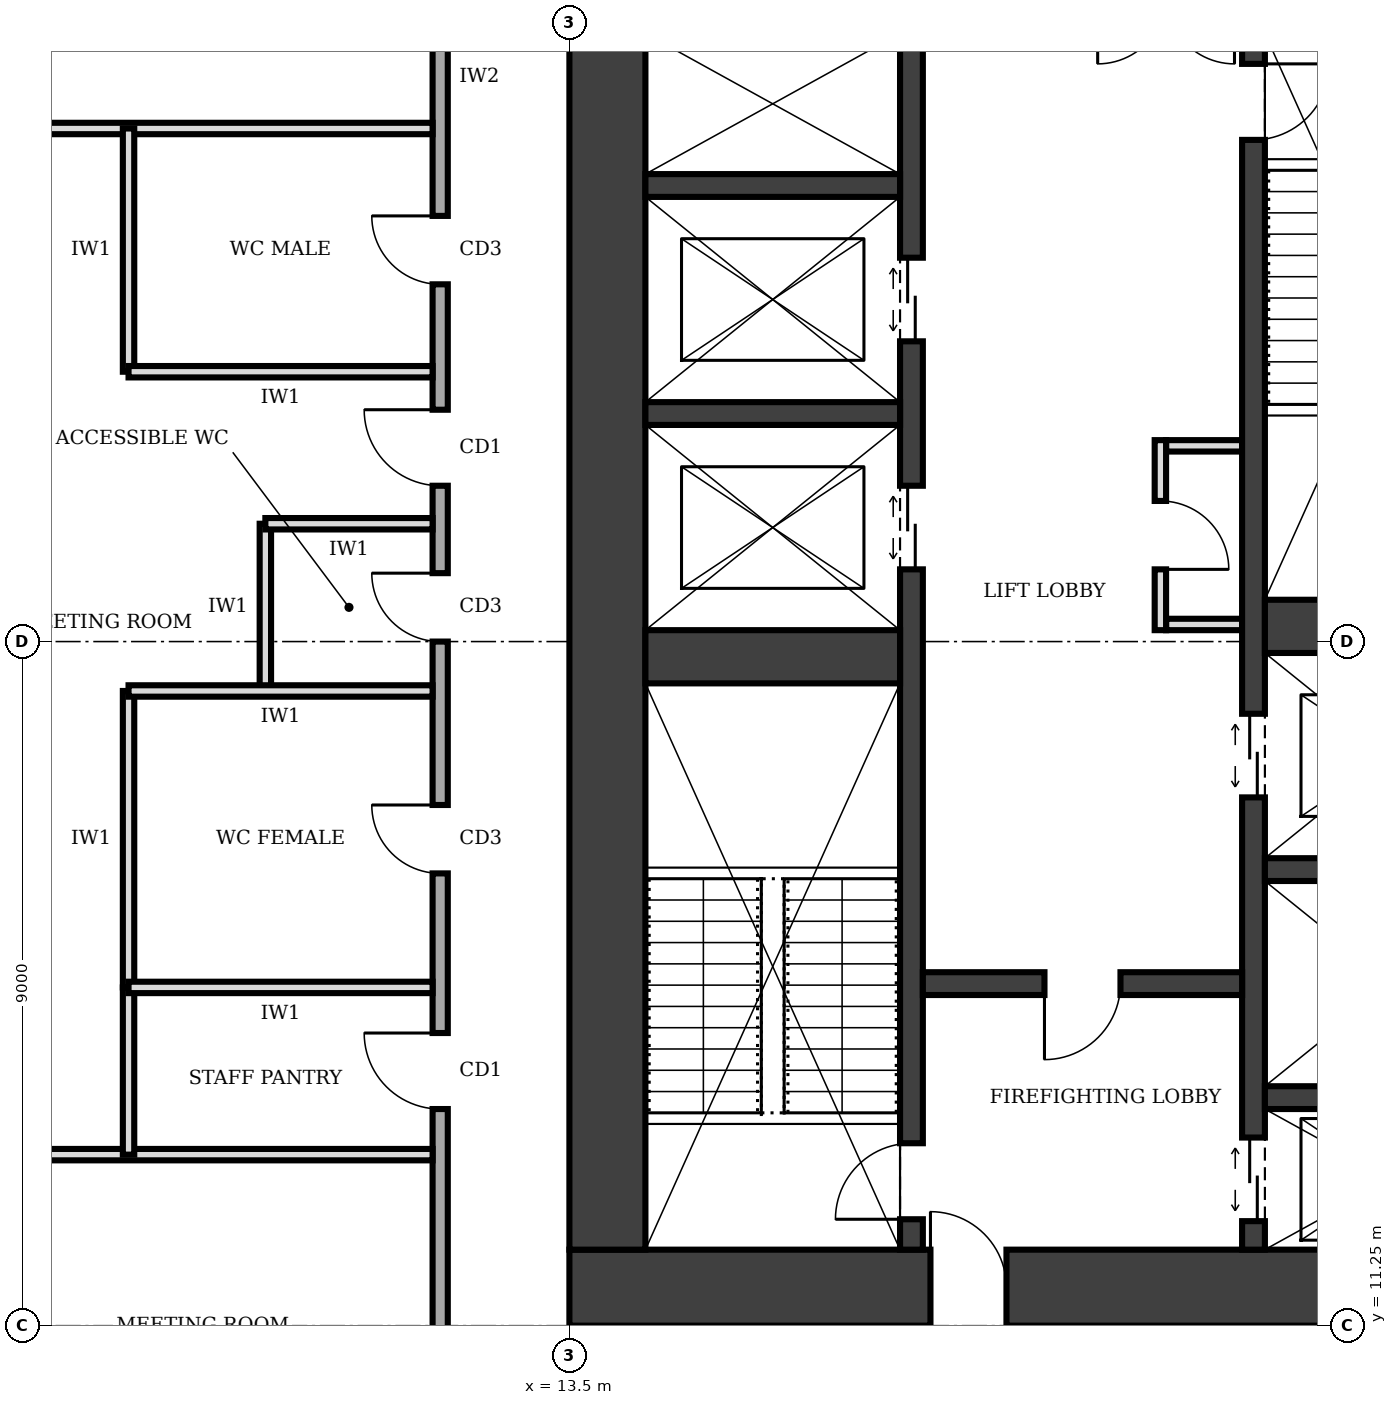
"""IFC4 building model, lengths in metres.
Left out: names, types, materials, properties, quantities, classifications, styles, units other than length and angle.
Written with IfcOpenShell. Run it as: python <this file> out.ifc"""

import sys

from ifc_helpers import new_model, si_unit, direction, frame, frame_2d, origin, place, context, subcontext, project, spatial, rectangle, extrude, element, fill, save


model = new_model("IFC4")
c1 = context("Model", 3, precision=1e-05, world=origin(), true_north=direction((0.0, 1.0)))
c2 = subcontext(c1, "Body", "Model", "MODEL_VIEW")
j1 = project(units=[si_unit("LENGTHUNIT", "METRE"), si_unit("PLANEANGLEUNIT", "RADIAN")], contexts=[c1])
p1 = place(None, origin())
s1 = spatial("IfcSite", under=j1, at=p1, CompositionType="ELEMENT")
p2 = place(p1, origin())
s2 = spatial("IfcBuilding", under=s1, at=p2, CompositionType="ELEMENT")
p3 = place(p2, frame((0.0, 0.0, 93.0)))
s3 = spatial("IfcBuildingStorey", under=s2, at=p3, CompositionType="ELEMENT", Elevation=93.0)
p4 = place(p3, frame((13.5, 11.75, 0.0), z_axis=(0.0, 0.0, 1.0), x_axis=(1.0, 0.0, 0.0)))
e1 = element("IfcWall", 1, at=p4, inside=s3, PredefinedType="SHEAR", context=c2, shape_type="SweptSolid", body=[
    extrude(rectangle(XDim=13.5, YDim=1.0, at=frame_2d((6.75, 0.0))), origin(), (0.0, 0.0, 1.0), 4.0),
])
p5 = place(p4, frame((4.75, 0.0, 0.0)))
e2 = element("IfcOpeningElement", 2, at=p5, cuts=e1, PredefinedType="OPENING", context=c2, shape_type="SweptSolid", body=[
    extrude(rectangle(XDim=1.0, YDim=2.1, at=frame_2d((0.5, 1.05))), frame((0.0, 0.51, 0.0), z_axis=(0.0, -1.0, 0.0), x_axis=(1.0, 0.0, 0.0)), (0.0, 0.0, 1.0), 1.02),
])
p6 = place(p3, frame((14.0, 28.25, 0.0), z_axis=(0.0, 0.0, 1.0), x_axis=(0.0, -1.0, 0.0)))
e3 = element("IfcWall", 3, at=p6, inside=s3, PredefinedType="SHEAR", context=c2, shape_type="SweptSolid", body=[
    extrude(rectangle(XDim=16.0, YDim=1.0, at=frame_2d((8.0, 0.0))), origin(), (0.0, 0.0, 1.0), 4.0),
])
p7 = place(p3, frame((18.0, 12.25, 0.0), z_axis=(0.0, 0.0, 1.0), x_axis=(0.0, 1.0, 0.0)))
e4 = element("IfcWall", 4, at=p7, inside=s3, PredefinedType="SHEAR", context=c2, shape_type="SweptSolid", body=[
    extrude(rectangle(XDim=16.0, YDim=0.3, at=frame_2d((8.0, 0.0))), origin(), (0.0, 0.0, 1.0), 4.0),
])
p8 = place(p7, frame((0.4, 0.0, 0.0)))
e5 = element("IfcOpeningElement", 5, at=p8, cuts=e4, PredefinedType="OPENING", context=c2, shape_type="SweptSolid", body=[
    extrude(rectangle(XDim=1.0, YDim=2.1, at=frame_2d((0.5, 1.05))), frame((0.0, 0.16, 0.0), z_axis=(0.0, -1.0, 0.0), x_axis=(1.0, 0.0, 0.0)), (0.0, 0.0, 1.0), 0.32),
])
p9 = place(p7, frame((8.95, 0.0, 0.0)))
e6 = element("IfcOpeningElement", 6, at=p9, cuts=e4, PredefinedType="OPENING", context=c2, shape_type="SweptSolid", body=[
    extrude(rectangle(XDim=1.1, YDim=2.1, at=frame_2d((0.55, 1.05))), frame((0.0, 0.16, 0.0), z_axis=(0.0, -1.0, 0.0), x_axis=(1.0, 0.0, 0.0)), (0.0, 0.0, 1.0), 0.32),
])
p10 = place(p7, frame((11.95, 0.0, 0.0)))
e7 = element("IfcOpeningElement", 7, at=p10, cuts=e4, PredefinedType="OPENING", context=c2, shape_type="SweptSolid", body=[
    extrude(rectangle(XDim=1.1, YDim=2.1, at=frame_2d((0.55, 1.05))), frame((0.0, 0.16, 0.0), z_axis=(0.0, -1.0, 0.0), x_axis=(1.0, 0.0, 0.0)), (0.0, 0.0, 1.0), 0.32),
])
p11 = place(p3, frame((22.5, 12.25, 0.0), z_axis=(0.0, 0.0, 1.0), x_axis=(0.0, 1.0, 0.0)))
e8 = element("IfcWall", 8, at=p11, inside=s3, PredefinedType="SHEAR", context=c2, shape_type="SweptSolid", body=[
    extrude(rectangle(XDim=16.0, YDim=0.3, at=frame_2d((8.0, 0.0))), origin(), (0.0, 0.0, 1.0), 4.0),
])
p12 = place(p11, frame((14.6, 0.0, 0.0)))
e9 = element("IfcOpeningElement", 9, at=p12, cuts=e8, PredefinedType="OPENING", context=c2, shape_type="SweptSolid", body=[
    extrude(rectangle(XDim=1.0, YDim=2.1, at=frame_2d((0.5, 1.05))), frame((0.0, 0.16, 0.0), z_axis=(0.0, -1.0, 0.0), x_axis=(1.0, 0.0, 0.0)), (0.0, 0.0, 1.0), 0.32),
])
p13 = place(p11, frame((0.375, 0.0, 0.0)))
e10 = element("IfcOpeningElement", 10, at=p13, cuts=e8, PredefinedType="OPENING", context=c2, shape_type="SweptSolid", body=[
    extrude(rectangle(XDim=1.1, YDim=2.1, at=frame_2d((0.55, 1.05))), frame((0.0, 0.16, 0.0), z_axis=(0.0, -1.0, 0.0), x_axis=(1.0, 0.0, 0.0)), (0.0, 0.0, 1.0), 0.32),
])
p14 = place(p11, frame((5.95, 0.0, 0.0)))
e11 = element("IfcOpeningElement", 11, at=p14, cuts=e8, PredefinedType="OPENING", context=c2, shape_type="SweptSolid", body=[
    extrude(rectangle(XDim=1.1, YDim=2.1, at=frame_2d((0.55, 1.05))), frame((0.0, 0.16, 0.0), z_axis=(0.0, -1.0, 0.0), x_axis=(1.0, 0.0, 0.0)), (0.0, 0.0, 1.0), 0.32),
])
p15 = place(p3, frame((14.5, 20.05, 0.0), z_axis=(0.0, 0.0, 1.0), x_axis=(1.0, 0.0, 0.0)))
e12 = element("IfcWall", 12, at=p15, inside=s3, PredefinedType="SHEAR", context=c2, shape_type="SweptSolid", body=[
    extrude(rectangle(XDim=3.35, YDim=0.7, at=frame_2d((1.675, 0.0))), origin(), (0.0, 0.0, 1.0), 4.0),
])
p16 = place(p3, frame((18.15, 15.75, 0.0), z_axis=(0.0, 0.0, 1.0), x_axis=(1.0, 0.0, 0.0)))
e13 = element("IfcWall", 13, at=p16, inside=s3, PredefinedType="SHEAR", context=c2, shape_type="SweptSolid", body=[
    extrude(rectangle(XDim=4.2, YDim=0.3, at=frame_2d((2.1, 0.0))), origin(), (0.0, 0.0, 1.0), 4.0),
])
p17 = place(p16, frame((1.6, 0.0, 0.0)))
e14 = element("IfcOpeningElement", 14, at=p17, cuts=e13, PredefinedType="OPENING", context=c2, shape_type="SweptSolid", body=[
    extrude(rectangle(XDim=1.0, YDim=2.1, at=frame_2d((0.5, 1.05))), frame((0.0, 0.16, 0.0), z_axis=(0.0, -1.0, 0.0), x_axis=(1.0, 0.0, 0.0)), (0.0, 0.0, 1.0), 0.32),
])
for number, where, z_axis, x_axis in (
    (15, (22.65, 14.25, 0.0), (0.0, 0.0, 1.0), (1.0, 0.0, 0.0)),
    (16, (22.65, 17.25, 0.0), (0.0, 0.0, 1.0), (1.0, 0.0, 0.0)),
):
    element("IfcWall", number, at=place(p3, frame(where, z_axis=z_axis, x_axis=x_axis)), inside=s3, PredefinedType="SHEAR", context=c2, shape_type="SweptSolid", body=[
        extrude(rectangle(XDim=3.35, YDim=0.3, at=frame_2d((1.675, 0.0))), origin(), (0.0, 0.0, 1.0), 4.0),
    ])
p18 = place(p3, frame((22.65, 20.45, 0.0), z_axis=(0.0, 0.0, 1.0), x_axis=(1.0, 0.0, 0.0)))
e17 = element("IfcWall", 17, at=p18, inside=s3, PredefinedType="SHEAR", context=c2, shape_type="SweptSolid", body=[
    extrude(rectangle(XDim=3.35, YDim=0.7, at=frame_2d((1.675, 0.0))), origin(), (0.0, 0.0, 1.0), 4.0),
])
for number, where, z_axis, x_axis in (
    (18, (14.5, 23.25, 0.0), (0.0, 0.0, 1.0), (1.0, 0.0, 0.0)),
    (19, (14.5, 26.25, 0.0), (0.0, 0.0, 1.0), (1.0, 0.0, 0.0)),
):
    element("IfcWall", number, at=place(p3, frame(where, z_axis=z_axis, x_axis=x_axis)), inside=s3, PredefinedType="SHEAR", context=c2, shape_type="SweptSolid", body=[
        extrude(rectangle(XDim=3.35, YDim=0.3, at=frame_2d((1.675, 0.0))), origin(), (0.0, 0.0, 1.0), 4.0),
    ])
p19 = place(p3, frame((21.275, 20.4, 0.0), z_axis=(0.0, 0.0, 1.0), x_axis=(0.0, 1.0, 0.0)))
e20 = element("IfcWall", 20, at=p19, inside=s3, PredefinedType="PARTITIONING", context=c2, shape_type="SweptSolid", body=[
    extrude(rectangle(XDim=2.5, YDim=0.15, at=frame_2d((1.25, 0.0))), origin(), (0.0, 0.0, 1.0), 3.75),
])
p20 = place(p19, frame((0.8, 0.0, 0.0)))
e21 = element("IfcOpeningElement", 21, at=p20, cuts=e20, PredefinedType="OPENING", context=c2, shape_type="SweptSolid", body=[
    extrude(rectangle(XDim=0.9, YDim=2.1, at=frame_2d((0.45, 1.05))), frame((0.0, 0.085, 0.0), z_axis=(0.0, -1.0, 0.0), x_axis=(1.0, 0.0, 0.0)), (0.0, 0.0, 1.0), 0.17),
])
for number, where, z_axis, x_axis in (
    (22, (21.35, 20.475, 0.0), (0.0, 0.0, 1.0), (1.0, 0.0, 0.0)),
    (23, (21.35, 22.825, 0.0), (0.0, 0.0, 1.0), (1.0, 0.0, 0.0)),
):
    element("IfcWall", number, at=place(p3, frame(where, z_axis=z_axis, x_axis=x_axis)), inside=s3, PredefinedType="PARTITIONING", context=c2, shape_type="SweptSolid", body=[
        extrude(rectangle(XDim=1.0, YDim=0.15, at=frame_2d((0.5, 0.0))), origin(), (0.0, 0.0, 1.0), 3.75),
    ])
p21 = place(p3, frame((11.8, 32.8, 0.0), z_axis=(0.0, 0.0, 1.0), x_axis=(0.0, -1.0, 0.0)))
e24 = element("IfcWall", 24, at=p21, inside=s3, PredefinedType="SOLIDWALL", context=c2, shape_type="SweptSolid", body=[
    extrude(rectangle(XDim=25.3, YDim=0.2, at=frame_2d((12.65, 0.0))), origin(), (0.0, 0.0, 1.0), 3.75),
])
p22 = place(p21, frame((21.8, 0.0, 0.0)))
e25 = element("IfcOpeningElement", 25, at=p22, cuts=e24, PredefinedType="OPENING", context=c2, shape_type="SweptSolid", body=[
    extrude(rectangle(XDim=1.0, YDim=2.1, at=frame_2d((0.5, 1.05))), frame((0.0, 0.11, 0.0), z_axis=(0.0, -1.0, 0.0), x_axis=(1.0, 0.0, 0.0)), (0.0, 0.0, 1.0), 0.22),
])
p23 = place(p21, frame((17.7, 0.0, 0.0)))
e26 = element("IfcOpeningElement", 26, at=p23, cuts=e24, PredefinedType="OPENING", context=c2, shape_type="SweptSolid", body=[
    extrude(rectangle(XDim=1.0, YDim=2.1, at=frame_2d((0.5, 1.05))), frame((0.0, 0.11, 0.0), z_axis=(0.0, -1.0, 0.0), x_axis=(1.0, 0.0, 0.0)), (0.0, 0.0, 1.0), 0.22),
])
p24 = place(p21, frame((14.7, 0.0, 0.0)))
e27 = element("IfcOpeningElement", 27, at=p24, cuts=e24, PredefinedType="OPENING", context=c2, shape_type="SweptSolid", body=[
    extrude(rectangle(XDim=0.9, YDim=2.1, at=frame_2d((0.45, 1.05))), frame((0.0, 0.11, 0.0), z_axis=(0.0, -1.0, 0.0), x_axis=(1.0, 0.0, 0.0)), (0.0, 0.0, 1.0), 0.22),
])
p25 = place(p21, frame((11.65, 0.0, 0.0)))
e28 = element("IfcOpeningElement", 28, at=p25, cuts=e24, PredefinedType="OPENING", context=c2, shape_type="SweptSolid", body=[
    extrude(rectangle(XDim=0.9, YDim=2.1, at=frame_2d((0.45, 1.05))), frame((0.0, 0.11, 0.0), z_axis=(0.0, -1.0, 0.0), x_axis=(1.0, 0.0, 0.0)), (0.0, 0.0, 1.0), 0.22),
])
p26 = place(p21, frame((6.95, 0.0, 0.0)))
e29 = element("IfcOpeningElement", 29, at=p26, cuts=e24, PredefinedType="OPENING", context=c2, shape_type="SweptSolid", body=[
    extrude(rectangle(XDim=0.9, YDim=2.1, at=frame_2d((0.45, 1.05))), frame((0.0, 0.11, 0.0), z_axis=(0.0, -1.0, 0.0), x_axis=(1.0, 0.0, 0.0)), (0.0, 0.0, 1.0), 0.22),
])
p27 = place(p21, frame((9.5, 0.0, 0.0)))
e30 = element("IfcOpeningElement", 30, at=p27, cuts=e24, PredefinedType="OPENING", context=c2, shape_type="SweptSolid", body=[
    extrude(rectangle(XDim=1.0, YDim=2.1, at=frame_2d((0.5, 1.05))), frame((0.0, 0.11, 0.0), z_axis=(0.0, -1.0, 0.0), x_axis=(1.0, 0.0, 0.0)), (0.0, 0.0, 1.0), 0.22),
])
p28 = place(p21, frame((2.3, 0.0, 0.0)))
e31 = element("IfcOpeningElement", 31, at=p28, cuts=e24, PredefinedType="OPENING", context=c2, shape_type="SweptSolid", body=[
    extrude(rectangle(XDim=1.0, YDim=2.1, at=frame_2d((0.5, 1.05))), frame((0.0, 0.11, 0.0), z_axis=(0.0, -1.0, 0.0), x_axis=(1.0, 0.0, 0.0)), (0.0, 0.0, 1.0), 0.22),
])
for number, where, z_axis, x_axis in (
    (32, (0.3, 13.5, 0.0), (0.0, 0.0, 1.0), (1.0, 0.0, 0.0)),
    (33, (0.3, 27.0, 0.0), (0.0, 0.0, 1.0), (1.0, 0.0, 0.0)),
):
    element("IfcWall", number, at=place(p3, frame(where, z_axis=z_axis, x_axis=x_axis)), inside=s3, PredefinedType="PARTITIONING", context=c2, shape_type="SweptSolid", body=[
        extrude(rectangle(XDim=11.4, YDim=0.15, at=frame_2d((5.7, 0.0))), origin(), (0.0, 0.0, 1.0), 3.75),
    ])
p29 = place(p3, frame((11.7, 15.7, 0.0), z_axis=(0.0, 0.0, 1.0), x_axis=(-1.0, 0.0, 0.0)))
e34 = element("IfcWall", 34, at=p29, inside=s3, PredefinedType="PARTITIONING", context=c2, shape_type="SweptSolid", body=[
    extrude(rectangle(XDim=4.0, YDim=0.15, at=frame_2d((2.0, 0.0))), origin(), (0.0, 0.0, 1.0), 3.75),
])
p30 = place(p3, frame((11.7, 19.6, 0.0), z_axis=(0.0, 0.0, 1.0), x_axis=(-1.0, 0.0, 0.0)))
e35 = element("IfcWall", 35, at=p30, inside=s3, PredefinedType="PARTITIONING", context=c2, shape_type="SweptSolid", body=[
    extrude(rectangle(XDim=4.0, YDim=0.15, at=frame_2d((2.0, 0.0))), origin(), (0.0, 0.0, 1.0), 2.85),
])
p31 = place(p3, frame((11.7, 21.8, 0.0), z_axis=(0.0, 0.0, 1.0), x_axis=(-1.0, 0.0, 0.0)))
e36 = element("IfcWall", 36, at=p31, inside=s3, PredefinedType="PARTITIONING", context=c2, shape_type="SweptSolid", body=[
    extrude(rectangle(XDim=2.2, YDim=0.15, at=frame_2d((1.1, 0.0))), origin(), (0.0, 0.0, 1.0), 3.75),
])
p32 = place(p3, frame((11.7, 23.8, 0.0), z_axis=(0.0, 0.0, 1.0), x_axis=(-1.0, 0.0, 0.0)))
e37 = element("IfcWall", 37, at=p32, inside=s3, PredefinedType="PARTITIONING", context=c2, shape_type="SweptSolid", body=[
    extrude(rectangle(XDim=4.0, YDim=0.15, at=frame_2d((2.0, 0.0))), origin(), (0.0, 0.0, 1.0), 3.75),
])
p33 = place(p3, frame((7.7, 13.5, 0.0), z_axis=(0.0, 0.0, 1.0), x_axis=(0.0, 1.0, 0.0)))
e38 = element("IfcWall", 38, at=p33, inside=s3, PredefinedType="PARTITIONING", context=c2, shape_type="SweptSolid", body=[
    extrude(rectangle(XDim=2.2, YDim=0.15, at=frame_2d((1.1, 0.0))), origin(), (0.0, 0.0, 1.0), 3.75),
])
p34 = place(p3, frame((7.7, 15.7, 0.0), z_axis=(0.0, 0.0, 1.0), x_axis=(0.0, 1.0, 0.0)))
e39 = element("IfcWall", 39, at=p34, inside=s3, PredefinedType="PARTITIONING", context=c2, shape_type="SweptSolid", body=[
    extrude(rectangle(XDim=3.9, YDim=0.15, at=frame_2d((1.95, 0.0))), origin(), (0.0, 0.0, 1.0), 3.75),
])
p35 = place(p3, frame((9.5, 19.6, 0.0), z_axis=(0.0, 0.0, 1.0), x_axis=(0.0, 1.0, 0.0)))
e40 = element("IfcWall", 40, at=p35, inside=s3, PredefinedType="PARTITIONING", context=c2, shape_type="SweptSolid", body=[
    extrude(rectangle(XDim=2.2, YDim=0.15, at=frame_2d((1.1, 0.0))), origin(), (0.0, 0.0, 1.0), 3.75),
])
p36 = place(p3, frame((7.7, 23.8, 0.0), z_axis=(0.0, 0.0, 1.0), x_axis=(0.0, 1.0, 0.0)))
e41 = element("IfcWall", 41, at=p36, inside=s3, PredefinedType="PARTITIONING", context=c2, shape_type="SweptSolid", body=[
    extrude(rectangle(XDim=3.2, YDim=0.15, at=frame_2d((1.6, 0.0))), origin(), (0.0, 0.0, 1.0), 3.75),
])
p37 = place(p5, origin())
e42 = element("IfcDoor", 42, at=p37, inside=s3, OperationType="SINGLE_SWING_LEFT", PredefinedType="DOOR", context=c2, shape_type="SweptSolid", body=[
    extrude(rectangle(XDim=1.0, YDim=2.1, at=frame_2d((0.5, 1.05))), frame((0.0, 0.025, 0.0), z_axis=(0.0, -1.0, 0.0), x_axis=(1.0, 0.0, 0.0)), (0.0, 0.0, 1.0), 0.05),
])
fill(e2, e42)
p38 = place(p17, frame((1.0, 0.0, 0.0), z_axis=(0.0, 0.0, 1.0), x_axis=(-1.0, 0.0, 0.0)))
e43 = element("IfcDoor", 43, at=p38, inside=s3, OperationType="SINGLE_SWING_RIGHT", PredefinedType="DOOR", context=c2, shape_type="SweptSolid", body=[
    extrude(rectangle(XDim=1.0, YDim=2.1, at=frame_2d((0.5, 1.05))), frame((0.0, 0.025, 0.0), z_axis=(0.0, -1.0, 0.0), x_axis=(1.0, 0.0, 0.0)), (0.0, 0.0, 1.0), 0.05),
])
fill(e14, e43)
p39 = place(p8, origin())
e44 = element("IfcDoor", 44, at=p39, inside=s3, OperationType="SINGLE_SWING_LEFT", PredefinedType="DOOR", context=c2, shape_type="SweptSolid", body=[
    extrude(rectangle(XDim=1.0, YDim=2.1, at=frame_2d((0.5, 1.05))), frame((0.0, 0.025, 0.0), z_axis=(0.0, -1.0, 0.0), x_axis=(1.0, 0.0, 0.0)), (0.0, 0.0, 1.0), 0.05),
])
fill(e5, e44)
p40 = place(p12, frame((1.0, 0.0, 0.0), z_axis=(0.0, 0.0, 1.0), x_axis=(-1.0, 0.0, 0.0)))
e45 = element("IfcDoor", 45, at=p40, inside=s3, OperationType="SINGLE_SWING_LEFT", PredefinedType="DOOR", context=c2, shape_type="SweptSolid", body=[
    extrude(rectangle(XDim=1.0, YDim=2.1, at=frame_2d((0.5, 1.05))), frame((0.0, 0.025, 0.0), z_axis=(0.0, -1.0, 0.0), x_axis=(1.0, 0.0, 0.0)), (0.0, 0.0, 1.0), 0.05),
])
fill(e9, e45)
p41 = place(p13, origin())
e46 = element("IfcDoor", 46, at=p41, inside=s3, OperationType="DOUBLE_DOOR_SLIDING", PredefinedType="DOOR", context=c2, shape_type="SweptSolid", body=[
    extrude(rectangle(XDim=1.1, YDim=2.1, at=frame_2d((0.55, 1.05))), frame((0.0, 0.025, 0.0), z_axis=(0.0, -1.0, 0.0), x_axis=(1.0, 0.0, 0.0)), (0.0, 0.0, 1.0), 0.05),
])
fill(e10, e46)
p42 = place(p9, origin())
e47 = element("IfcDoor", 47, at=p42, inside=s3, OperationType="DOUBLE_DOOR_SLIDING", PredefinedType="DOOR", context=c2, shape_type="SweptSolid", body=[
    extrude(rectangle(XDim=1.1, YDim=2.1, at=frame_2d((0.55, 1.05))), frame((0.0, 0.025, 0.0), z_axis=(0.0, -1.0, 0.0), x_axis=(1.0, 0.0, 0.0)), (0.0, 0.0, 1.0), 0.05),
])
fill(e6, e47)
p43 = place(p10, origin())
e48 = element("IfcDoor", 48, at=p43, inside=s3, OperationType="DOUBLE_DOOR_SLIDING", PredefinedType="DOOR", context=c2, shape_type="SweptSolid", body=[
    extrude(rectangle(XDim=1.1, YDim=2.1, at=frame_2d((0.55, 1.05))), frame((0.0, 0.025, 0.0), z_axis=(0.0, -1.0, 0.0), x_axis=(1.0, 0.0, 0.0)), (0.0, 0.0, 1.0), 0.05),
])
fill(e7, e48)
p44 = place(p14, origin())
e49 = element("IfcDoor", 49, at=p44, inside=s3, OperationType="DOUBLE_DOOR_SLIDING", PredefinedType="DOOR", context=c2, shape_type="SweptSolid", body=[
    extrude(rectangle(XDim=1.1, YDim=2.1, at=frame_2d((0.55, 1.05))), frame((0.0, 0.025, 0.0), z_axis=(0.0, -1.0, 0.0), x_axis=(1.0, 0.0, 0.0)), (0.0, 0.0, 1.0), 0.05),
])
fill(e11, e49)
p45 = place(p20, frame((0.9, 0.0, 0.0), z_axis=(0.0, 0.0, 1.0), x_axis=(-1.0, 0.0, 0.0)))
e50 = element("IfcDoor", 50, at=p45, inside=s3, OperationType="SINGLE_SWING_RIGHT", PredefinedType="DOOR", context=c2, shape_type="SweptSolid", body=[
    extrude(rectangle(XDim=0.9, YDim=2.1, at=frame_2d((0.45, 1.05))), frame((0.0, 0.025, 0.0), z_axis=(0.0, -1.0, 0.0), x_axis=(1.0, 0.0, 0.0)), (0.0, 0.0, 1.0), 0.05),
])
fill(e21, e50)
p46 = place(p23, frame((1.0, 0.0, 0.0), z_axis=(0.0, 0.0, 1.0), x_axis=(-1.0, 0.0, 0.0)))
e51 = element("IfcDoor", 51, at=p46, inside=s3, OperationType="SINGLE_SWING_RIGHT", PredefinedType="DOOR", context=c2, shape_type="SweptSolid", body=[
    extrude(rectangle(XDim=1.0, YDim=2.1, at=frame_2d((0.5, 1.05))), frame((0.0, 0.025, 0.0), z_axis=(0.0, -1.0, 0.0), x_axis=(1.0, 0.0, 0.0)), (0.0, 0.0, 1.0), 0.05),
])
fill(e26, e51)
p47 = place(p24, frame((0.9, 0.0, 0.0), z_axis=(0.0, 0.0, 1.0), x_axis=(-1.0, 0.0, 0.0)))
e52 = element("IfcDoor", 52, at=p47, inside=s3, OperationType="SINGLE_SWING_RIGHT", PredefinedType="DOOR", context=c2, shape_type="SweptSolid", body=[
    extrude(rectangle(XDim=0.9, YDim=2.1, at=frame_2d((0.45, 1.05))), frame((0.0, 0.025, 0.0), z_axis=(0.0, -1.0, 0.0), x_axis=(1.0, 0.0, 0.0)), (0.0, 0.0, 1.0), 0.05),
])
fill(e27, e52)
p48 = place(p25, frame((0.9, 0.0, 0.0), z_axis=(0.0, 0.0, 1.0), x_axis=(-1.0, 0.0, 0.0)))
e53 = element("IfcDoor", 53, at=p48, inside=s3, OperationType="SINGLE_SWING_RIGHT", PredefinedType="DOOR", context=c2, shape_type="SweptSolid", body=[
    extrude(rectangle(XDim=0.9, YDim=2.1, at=frame_2d((0.45, 1.05))), frame((0.0, 0.025, 0.0), z_axis=(0.0, -1.0, 0.0), x_axis=(1.0, 0.0, 0.0)), (0.0, 0.0, 1.0), 0.05),
])
fill(e28, e53)
p49 = place(p26, frame((0.9, 0.0, 0.0), z_axis=(0.0, 0.0, 1.0), x_axis=(-1.0, 0.0, 0.0)))
e54 = element("IfcDoor", 54, at=p49, inside=s3, OperationType="SINGLE_SWING_RIGHT", PredefinedType="DOOR", context=c2, shape_type="SweptSolid", body=[
    extrude(rectangle(XDim=0.9, YDim=2.1, at=frame_2d((0.45, 1.05))), frame((0.0, 0.025, 0.0), z_axis=(0.0, -1.0, 0.0), x_axis=(1.0, 0.0, 0.0)), (0.0, 0.0, 1.0), 0.05),
])
fill(e29, e54)
p50 = place(p27, frame((1.0, 0.0, 0.0), z_axis=(0.0, 0.0, 1.0), x_axis=(-1.0, 0.0, 0.0)))
e55 = element("IfcDoor", 55, at=p50, inside=s3, OperationType="SINGLE_SWING_RIGHT", PredefinedType="DOOR", context=c2, shape_type="SweptSolid", body=[
    extrude(rectangle(XDim=1.0, YDim=2.1, at=frame_2d((0.5, 1.05))), frame((0.0, 0.025, 0.0), z_axis=(0.0, -1.0, 0.0), x_axis=(1.0, 0.0, 0.0)), (0.0, 0.0, 1.0), 0.05),
])
fill(e30, e55)
save(model, sys.argv[1])
